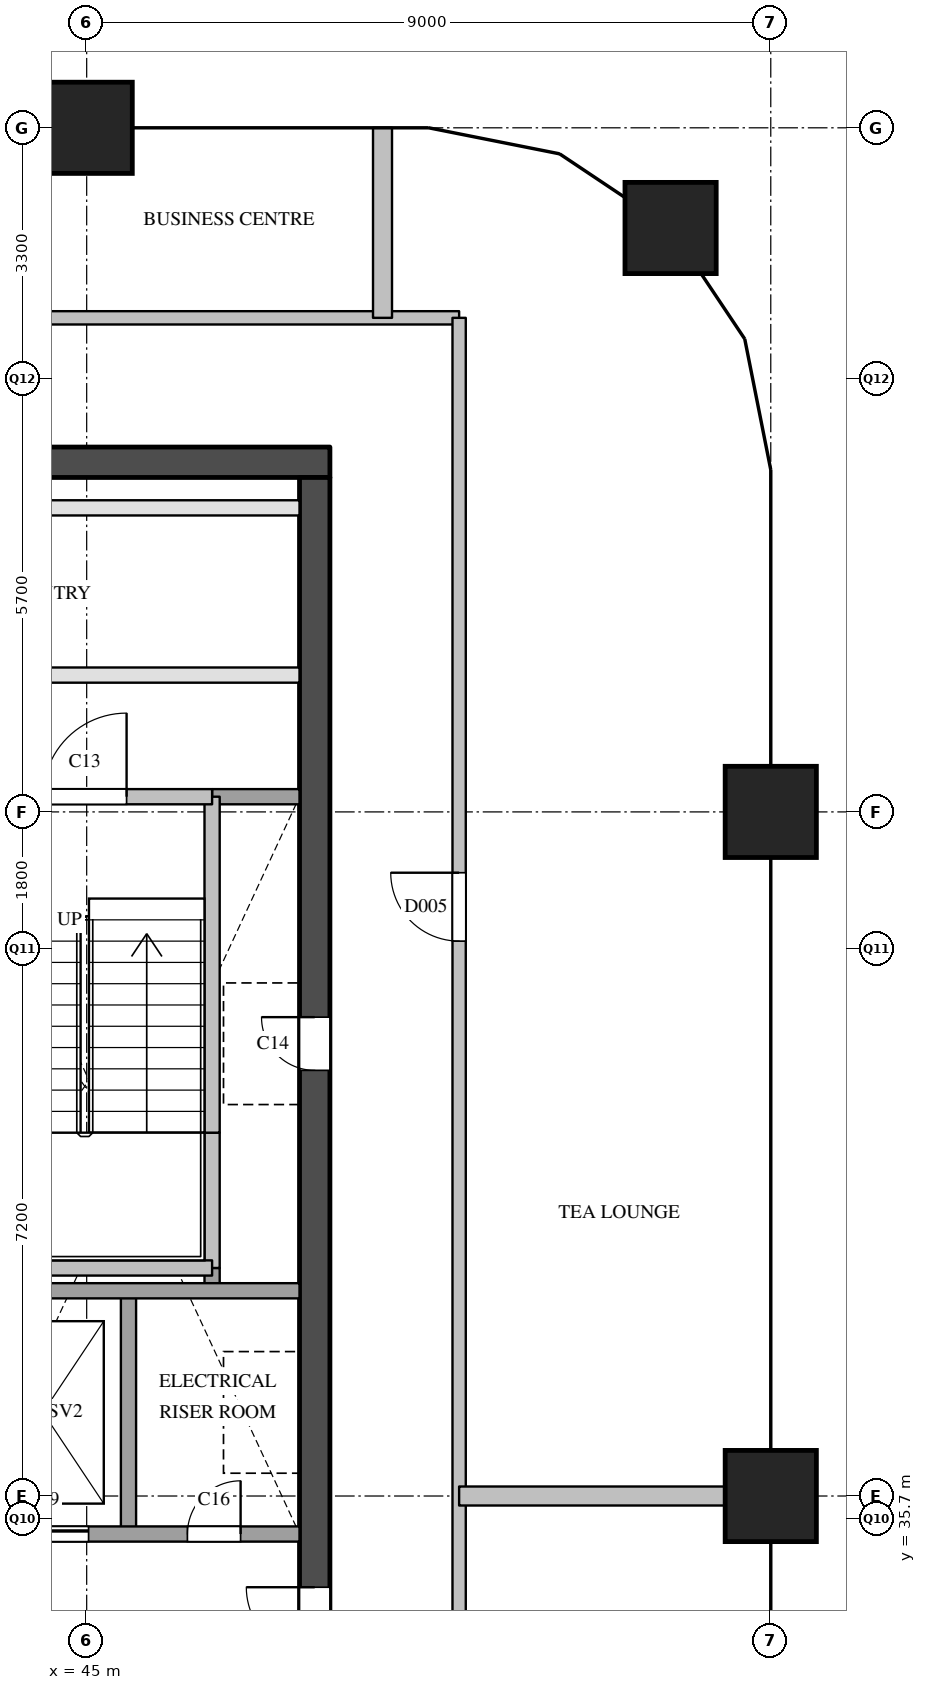
"""IFC4 building model, lengths in metres.
Left out: names, types, materials, properties, quantities, classifications, styles, units other than length and angle.
Written with IfcOpenShell. Run it as: python <this file> out.ifc"""

import sys

from ifc_helpers import new_model, si_unit, direction, frame, frame_2d, origin, origin_2d, place, context, subcontext, project, spatial, rectangle, extrude, element, fill, save


model = new_model("IFC4")
c1 = context("Model", 3, precision=1e-05, world=origin(), true_north=direction((0.0, 1.0)))
c2 = subcontext(c1, "Body", "Model", "MODEL_VIEW")
j1 = project(units=[si_unit("LENGTHUNIT", "METRE"), si_unit("PLANEANGLEUNIT", "RADIAN")], contexts=[c1])
p1 = place(None, origin())
s1 = spatial("IfcSite", under=j1, at=p1, CompositionType="ELEMENT")
p2 = place(p1, origin())
s2 = spatial("IfcBuilding", under=s1, at=p2, CompositionType="ELEMENT")
p3 = place(p2, frame((0.0, 0.0, 211.1)))
s3 = spatial("IfcBuildingStorey", under=s2, at=p3, CompositionType="ELEMENT", Elevation=211.1)
for number, where, z_axis, x_axis in (
    (1, (45.0, 54.0, 0.0), (0.0, 0.0, 1.0), (1.0, 0.0, 0.0)),
    (2, (54.0, 36.0, 0.0), (0.0, 0.0, 1.0), (1.0, 0.0, 0.0)),
    (3, (54.0, 45.0, 0.0), (0.0, 0.0, 1.0), (1.0, 0.0, 0.0)),
    (4, (52.682, 52.682, 0.0), (0.0, 0.0, 1.0), (1.0, 0.0, 0.0)),
):
    element("IfcColumn", number, at=place(p3, frame(where, z_axis=z_axis, x_axis=x_axis)), inside=s3, PredefinedType="COLUMN", context=c2, shape_type="SweptSolid", body=[
        extrude(rectangle(XDim=1.2, YDim=1.2, at=origin_2d()), origin(), (0.0, 0.0, 1.0), 3.9),
    ])
p4 = place(p3, frame((36.2, 49.6, 0.0), z_axis=(0.0, 0.0, 1.0), x_axis=(1.0, 0.0, 0.0)))
e5 = element("IfcWall", 5, at=p4, inside=s3, PredefinedType="SHEAR", context=c2, shape_type="SweptSolid", body=[
    extrude(rectangle(XDim=12.0, YDim=0.4, at=frame_2d((6.0, 0.0))), origin(), (0.0, 0.0, 1.0), 3.6),
])
p5 = place(p3, frame((48.0, 29.1, 0.0), z_axis=(0.0, 0.0, 1.0), x_axis=(0.0, 1.0, 0.0)))
e6 = element("IfcWall", 6, at=p5, inside=s3, PredefinedType="SHEAR", context=c2, shape_type="SweptSolid", body=[
    extrude(rectangle(XDim=20.3, YDim=0.4, at=frame_2d((10.15, 0.0))), origin(), (0.0, 0.0, 1.0), 3.6),
])
p6 = place(p5, frame((12.5, 0.0, 0.0)))
e7 = element("IfcOpeningElement", 7, at=p6, cuts=e6, PredefinedType="OPENING", context=c2, shape_type="SweptSolid", body=[
    extrude(rectangle(XDim=0.7, YDim=2.1, at=frame_2d((0.35, 1.05))), frame((0.0, 0.21, 0.0), z_axis=(0.0, -1.0, 0.0), x_axis=(1.0, 0.0, 0.0)), (0.0, 0.0, 1.0), 0.42),
])
p7 = place(p5, frame((3.9, 0.0, 0.0)))
e8 = element("IfcOpeningElement", 8, at=p7, cuts=e6, PredefinedType="OPENING", context=c2, shape_type="SweptSolid", body=[
    extrude(rectangle(XDim=1.8, YDim=2.1, at=frame_2d((0.9, 1.05))), frame((0.0, 0.21, 0.0), z_axis=(0.0, -1.0, 0.0), x_axis=(1.0, 0.0, 0.0)), (0.0, 0.0, 1.0), 0.42),
])
p8 = place(p3, frame((45.55, 35.5, 0.0), z_axis=(0.0, 0.0, 1.0), x_axis=(0.0, 1.0, 0.0)))
e9 = element("IfcWall", 9, at=p8, inside=s3, PredefinedType="SOLIDWALL", context=c2, shape_type="SweptSolid", body=[
    extrude(rectangle(XDim=3.2, YDim=0.2, at=frame_2d((1.6, 0.0))), origin(), (0.0, 0.0, 1.0), 3.6),
])
p9 = place(p3, frame((46.65, 38.7, 0.0), z_axis=(0.0, 0.0, 1.0), x_axis=(0.0, 1.0, 0.0)))
e10 = element("IfcWall", 10, at=p9, inside=s3, PredefinedType="SOLIDWALL", context=c2, shape_type="SweptSolid", body=[
    extrude(rectangle(XDim=0.3, YDim=0.2, at=frame_2d((0.15, 0.0))), origin(), (0.0, 0.0, 1.0), 3.6),
])
p10 = place(p3, frame((46.65, 39.0, 0.0), z_axis=(0.0, 0.0, 1.0), x_axis=(0.0, 1.0, 0.0)))
e11 = element("IfcWall", 11, at=p10, inside=s3, PredefinedType="SOLIDWALL", context=c2, shape_type="SweptSolid", body=[
    extrude(rectangle(XDim=1.78, YDim=0.2, at=frame_2d((0.89, 0.0))), origin(), (0.0, 0.0, 1.0), 3.6),
])
p11 = place(p3, frame((46.65, 40.78, 0.0), z_axis=(0.0, 0.0, 1.0), x_axis=(0.0, 1.0, 0.0)))
e12 = element("IfcWall", 12, at=p11, inside=s3, PredefinedType="SOLIDWALL", context=c2, shape_type="SweptSolid", body=[
    extrude(rectangle(XDim=4.42, YDim=0.2, at=frame_2d((2.21, 0.0))), origin(), (0.0, 0.0, 1.0), 3.6),
])
p12 = place(p3, frame((43.3, 35.5, 0.0), z_axis=(0.0, 0.0, 1.0), x_axis=(1.0, 0.0, 0.0)))
e13 = element("IfcWall", 13, at=p12, inside=s3, PredefinedType="SOLIDWALL", context=c2, shape_type="SweptSolid", body=[
    extrude(rectangle(XDim=4.5, YDim=0.2, at=frame_2d((2.25, 0.0))), origin(), (0.0, 0.0, 1.0), 3.6),
])
p13 = place(p12, frame((0.525, 0.0, 0.0)))
e14 = element("IfcOpeningElement", 14, at=p13, cuts=e13, PredefinedType="OPENING", context=c2, shape_type="SweptSolid", body=[
    extrude(rectangle(XDim=1.2, YDim=2.1, at=frame_2d((0.6, 1.05))), frame((0.0, 0.11, 0.0), z_axis=(0.0, -1.0, 0.0), x_axis=(1.0, 0.0, 0.0)), (0.0, 0.0, 1.0), 0.22),
])
p14 = place(p12, frame((3.025, 0.0, 0.0)))
e15 = element("IfcOpeningElement", 15, at=p14, cuts=e13, PredefinedType="OPENING", context=c2, shape_type="SweptSolid", body=[
    extrude(rectangle(XDim=0.7, YDim=2.1, at=frame_2d((0.35, 1.05))), frame((0.0, 0.11, 0.0), z_axis=(0.0, -1.0, 0.0), x_axis=(1.0, 0.0, 0.0)), (0.0, 0.0, 1.0), 0.22),
])
p15 = place(p3, frame((43.3, 38.7, 0.0), z_axis=(0.0, 0.0, 1.0), x_axis=(1.0, 0.0, 0.0)))
e16 = element("IfcWall", 16, at=p15, inside=s3, PredefinedType="SOLIDWALL", context=c2, shape_type="SweptSolid", body=[
    extrude(rectangle(XDim=4.5, YDim=0.2, at=frame_2d((2.25, 0.0))), origin(), (0.0, 0.0, 1.0), 3.6),
])
p16 = place(p3, frame((43.4, 39.0, 0.0), z_axis=(0.0, 0.0, 1.0), x_axis=(1.0, 0.0, 0.0)))
e17 = element("IfcWall", 17, at=p16, inside=s3, PredefinedType="SOLIDWALL", context=c2, shape_type="SweptSolid", body=[
    extrude(rectangle(XDim=3.25, YDim=0.2, at=frame_2d((1.625, 0.0))), origin(), (0.0, 0.0, 1.0), 3.6),
])
p17 = place(p3, frame((46.65, 45.2, 0.0), z_axis=(0.0, 0.0, 1.0), x_axis=(1.0, 0.0, 0.0)))
e18 = element("IfcWall", 18, at=p17, inside=s3, PredefinedType="SOLIDWALL", context=c2, shape_type="SweptSolid", body=[
    extrude(rectangle(XDim=1.15, YDim=0.2, at=frame_2d((0.575, 0.0))), origin(), (0.0, 0.0, 1.0), 3.6),
])
p18 = place(p3, frame((36.6, 45.2, 0.0), z_axis=(0.0, 0.0, 1.0), x_axis=(1.0, 0.0, 0.0)))
e19 = element("IfcWall", 19, at=p18, inside=s3, PredefinedType="SOLIDWALL", context=c2, shape_type="SweptSolid", body=[
    extrude(rectangle(XDim=10.05, YDim=0.2, at=frame_2d((5.025, 0.0))), origin(), (0.0, 0.0, 1.0), 3.6),
])
p19 = place(p18, frame((1.125, 0.0, 0.0)))
e20 = element("IfcOpeningElement", 20, at=p19, cuts=e19, PredefinedType="OPENING", context=c2, shape_type="SweptSolid", body=[
    extrude(rectangle(XDim=1.1, YDim=2.1, at=frame_2d((0.55, 1.05))), frame((0.0, 0.11, 0.0), z_axis=(0.0, -1.0, 0.0), x_axis=(1.0, 0.0, 0.0)), (0.0, 0.0, 1.0), 0.22),
])
p20 = place(p18, frame((4.475, 0.0, 0.0)))
e21 = element("IfcOpeningElement", 21, at=p20, cuts=e19, PredefinedType="OPENING", context=c2, shape_type="SweptSolid", body=[
    extrude(rectangle(XDim=1.1, YDim=2.1, at=frame_2d((0.55, 1.05))), frame((0.0, 0.11, 0.0), z_axis=(0.0, -1.0, 0.0), x_axis=(1.0, 0.0, 0.0)), (0.0, 0.0, 1.0), 0.22),
])
p21 = place(p18, frame((7.825, 0.0, 0.0)))
e22 = element("IfcOpeningElement", 22, at=p21, cuts=e19, PredefinedType="OPENING", context=c2, shape_type="SweptSolid", body=[
    extrude(rectangle(XDim=1.1, YDim=2.1, at=frame_2d((0.55, 1.05))), frame((0.0, 0.11, 0.0), z_axis=(0.0, -1.0, 0.0), x_axis=(1.0, 0.0, 0.0)), (0.0, 0.0, 1.0), 0.22),
])
p22 = place(p3, frame((36.6, 46.8, 0.0), z_axis=(0.0, 0.0, 1.0), x_axis=(1.0, 0.0, 0.0)))
e23 = element("IfcWall", 23, at=p22, inside=s3, PredefinedType="PARTITIONING", context=c2, shape_type="SweptSolid", body=[
    extrude(rectangle(XDim=11.2, YDim=0.2, at=frame_2d((5.6, 0.0))), origin(), (0.0, 0.0, 1.0), 3.6),
])
p23 = place(p22, frame((0.67, 0.0, 0.0)))
e24 = element("IfcOpeningElement", 24, at=p23, cuts=e23, PredefinedType="OPENING", context=c2, shape_type="SweptSolid", body=[
    extrude(rectangle(XDim=0.9, YDim=2.1, at=frame_2d((0.45, 1.05))), frame((0.0, 0.11, 0.0), z_axis=(0.0, -1.0, 0.0), x_axis=(1.0, 0.0, 0.0)), (0.0, 0.0, 1.0), 0.22),
])
p24 = place(p22, frame((6.27, 0.0, 0.0)))
e25 = element("IfcOpeningElement", 25, at=p24, cuts=e23, PredefinedType="OPENING", context=c2, shape_type="SweptSolid", body=[
    extrude(rectangle(XDim=0.9, YDim=2.1, at=frame_2d((0.45, 1.05))), frame((0.0, 0.11, 0.0), z_axis=(0.0, -1.0, 0.0), x_axis=(1.0, 0.0, 0.0)), (0.0, 0.0, 1.0), 0.22),
])
p25 = place(p3, frame((36.6, 49.0, 0.0), z_axis=(0.0, 0.0, 1.0), x_axis=(1.0, 0.0, 0.0)))
e26 = element("IfcWall", 26, at=p25, inside=s3, PredefinedType="PARTITIONING", context=c2, shape_type="SweptSolid", body=[
    extrude(rectangle(XDim=11.2, YDim=0.2, at=frame_2d((5.6, 0.0))), origin(), (0.0, 0.0, 1.0), 3.6),
])
p26 = place(p3, frame((34.5, 51.5, 0.0), z_axis=(0.0, 0.0, 1.0), x_axis=(1.0, 0.0, 0.0)))
e27 = element("IfcWall", 27, at=p26, inside=s3, PredefinedType="PARTITIONING", context=c2, shape_type="SweptSolid", body=[
    extrude(rectangle(XDim=15.4, YDim=0.175, at=frame_2d((7.7, 0.0))), origin(), (0.0, 0.0, 1.0), 3.6),
])
p27 = place(p26, frame((7.496, 0.0, 0.0)))
e28 = element("IfcOpeningElement", 28, at=p27, cuts=e27, PredefinedType="OPENING", context=c2, shape_type="SweptSolid", body=[
    extrude(rectangle(XDim=0.9, YDim=2.1, at=frame_2d((0.45, 1.05))), frame((0.0, 0.097, 0.0), z_axis=(0.0, -1.0, 0.0), x_axis=(1.0, 0.0, 0.0)), (0.0, 0.0, 1.0), 0.195),
])
p28 = place(p3, frame((49.9, 28.5, 0.0), z_axis=(0.0, 0.0, 1.0), x_axis=(0.0, 1.0, 0.0)))
e29 = element("IfcWall", 29, at=p28, inside=s3, PredefinedType="PARTITIONING", context=c2, shape_type="SweptSolid", body=[
    extrude(rectangle(XDim=23.0, YDim=0.175, at=frame_2d((11.5, 0.0))), origin(), (0.0, 0.0, 1.0), 3.6),
])
p29 = place(p28, frame((14.8, 0.0, 0.0)))
e30 = element("IfcOpeningElement", 30, at=p29, cuts=e29, PredefinedType="OPENING", context=c2, shape_type="SweptSolid", body=[
    extrude(rectangle(XDim=0.9, YDim=2.1, at=frame_2d((0.45, 1.05))), frame((0.0, 0.097, 0.0), z_axis=(0.0, -1.0, 0.0), x_axis=(1.0, 0.0, 0.0)), (0.0, 0.0, 1.0), 0.195),
])
p30 = place(p3, frame((49.9, 36.0, 0.0), z_axis=(0.0, 0.0, 1.0), x_axis=(1.0, 0.0, 0.0)))
e31 = element("IfcWall", 31, at=p30, inside=s3, PredefinedType="PARTITIONING", context=c2, shape_type="SweptSolid", body=[
    extrude(rectangle(XDim=4.1, YDim=0.25, at=frame_2d((2.05, 0.0))), origin(), (0.0, 0.0, 1.0), 3.6),
])
p31 = place(p3, frame((48.892, 51.5, 0.0), z_axis=(0.0, 0.0, 1.0), x_axis=(0.0, 1.0, 0.0)))
e32 = element("IfcWall", 32, at=p31, inside=s3, PredefinedType="PARTITIONING", context=c2, shape_type="SweptSolid", body=[
    extrude(rectangle(XDim=2.5, YDim=0.25, at=frame_2d((1.25, 0.0))), origin(), (0.0, 0.0, 1.0), 2.6),
])
p32 = place(p13, origin())
e33 = element("IfcDoor", 33, at=p32, inside=s3, OperationType="SLIDING_TO_LEFT", PredefinedType="DOOR", context=c2, shape_type="SweptSolid", body=[
    extrude(rectangle(XDim=1.2, YDim=2.1, at=frame_2d((0.6, 1.05))), frame((0.0, 0.025, 0.0), z_axis=(0.0, -1.0, 0.0), x_axis=(1.0, 0.0, 0.0)), (0.0, 0.0, 1.0), 0.05),
])
fill(e14, e33)
p33 = place(p21, origin())
e34 = element("IfcDoor", 34, at=p33, inside=s3, OperationType="SINGLE_SWING_RIGHT", PredefinedType="DOOR", context=c2, shape_type="SweptSolid", body=[
    extrude(rectangle(XDim=1.1, YDim=2.1, at=frame_2d((0.55, 1.05))), frame((0.0, 0.025, 0.0), z_axis=(0.0, -1.0, 0.0), x_axis=(1.0, 0.0, 0.0)), (0.0, 0.0, 1.0), 0.05),
])
fill(e22, e34)
p34 = place(p6, origin())
e35 = element("IfcDoor", 35, at=p34, inside=s3, OperationType="SINGLE_SWING_RIGHT", PredefinedType="DOOR", context=c2, shape_type="SweptSolid", body=[
    extrude(rectangle(XDim=0.7, YDim=2.1, at=frame_2d((0.35, 1.05))), frame((0.0, 0.025, 0.0), z_axis=(0.0, -1.0, 0.0), x_axis=(1.0, 0.0, 0.0)), (0.0, 0.0, 1.0), 0.05),
])
fill(e7, e35)
p35 = place(p7, origin())
e36 = element("IfcDoor", 36, at=p35, inside=s3, OperationType="DOUBLE_DOOR_SINGLE_SWING", PredefinedType="DOOR", context=c2, shape_type="SweptSolid", body=[
    extrude(rectangle(XDim=1.8, YDim=2.1, at=frame_2d((0.9, 1.05))), frame((0.0, 0.025, 0.0), z_axis=(0.0, -1.0, 0.0), x_axis=(1.0, 0.0, 0.0)), (0.0, 0.0, 1.0), 0.05),
])
fill(e8, e36)
p36 = place(p14, origin())
e37 = element("IfcDoor", 37, at=p36, inside=s3, OperationType="SINGLE_SWING_RIGHT", PredefinedType="DOOR", context=c2, shape_type="SweptSolid", body=[
    extrude(rectangle(XDim=0.7, YDim=2.1, at=frame_2d((0.35, 1.05))), frame((0.0, 0.025, 0.0), z_axis=(0.0, -1.0, 0.0), x_axis=(1.0, 0.0, 0.0)), (0.0, 0.0, 1.0), 0.05),
])
fill(e15, e37)
p37 = place(p29, origin())
e38 = element("IfcDoor", 38, at=p37, inside=s3, OperationType="SINGLE_SWING_RIGHT", PredefinedType="DOOR", context=c2, shape_type="SweptSolid", body=[
    extrude(rectangle(XDim=0.9, YDim=2.1, at=frame_2d((0.45, 1.05))), frame((0.0, 0.025, 0.0), z_axis=(0.0, -1.0, 0.0), x_axis=(1.0, 0.0, 0.0)), (0.0, 0.0, 1.0), 0.05),
])
fill(e30, e38)
save(model, sys.argv[1])
